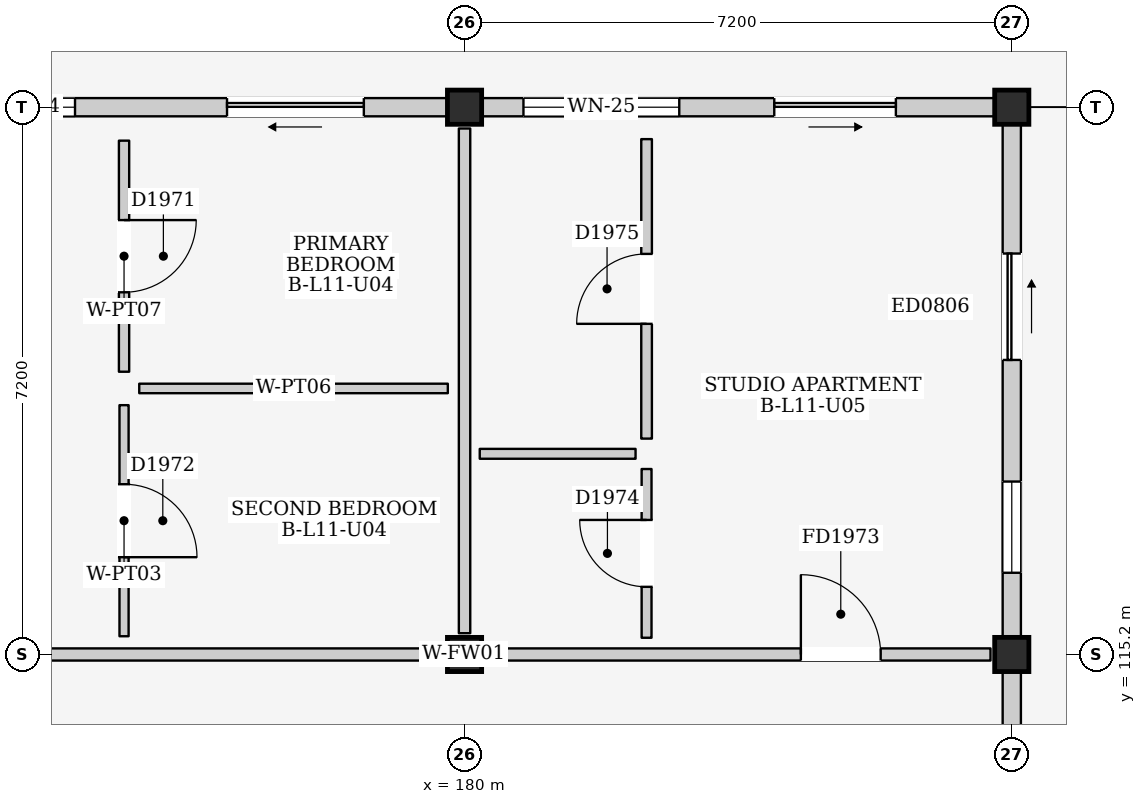
"""IFC4 building model, lengths in metres.
Left out: names, types, materials, properties, quantities, classifications, styles, units other than length and angle.
Written with IfcOpenShell. Run it as: python <this file> out.ifc"""

import sys

from ifc_helpers import new_model, si_unit, direction, frame, frame_2d, origin, origin_2d, place, context, subcontext, project, spatial, rectangle, extrude, element, fill, save


model = new_model("IFC4")
c1 = context("Model", 3, precision=1e-05, world=origin(), true_north=direction((0.0, 1.0)))
c2 = subcontext(c1, "Body", "Model", "MODEL_VIEW")
j1 = project(units=[si_unit("LENGTHUNIT", "METRE"), si_unit("PLANEANGLEUNIT", "RADIAN")], contexts=[c1])
p1 = place(None, origin())
s1 = spatial("IfcSite", under=j1, at=p1, CompositionType="ELEMENT")
p2 = place(p1, origin())
s2 = spatial("IfcBuilding", under=s1, at=p2, CompositionType="ELEMENT")
p3 = place(p2, frame((0.0, 0.0, 38.0)))
s3 = spatial("IfcBuildingStorey", under=s2, at=p3, CompositionType="ELEMENT", Elevation=38.0)
for number, where, z_axis, x_axis in (
    (1, (180.0, 115.2, 0.0), (0.0, 0.0, 1.0), (1.0, 0.0, 0.0)),
    (2, (180.0, 122.4, 0.0), (0.0, 0.0, 1.0), (1.0, 0.0, 0.0)),
    (3, (187.2, 115.2, 0.0), (0.0, 0.0, 1.0), (1.0, 0.0, 0.0)),
    (4, (187.2, 122.4, 0.0), (0.0, 0.0, 1.0), (1.0, 0.0, 0.0)),
):
    element("IfcColumn", number, at=place(p3, frame(where, z_axis=z_axis, x_axis=x_axis)), inside=s3, PredefinedType="COLUMN", context=c2, shape_type="SweptSolid", body=[
        extrude(rectangle(XDim=0.45, YDim=0.45, at=origin_2d()), origin(), (0.0, 0.0, 1.0), 3.2),
    ])
p4 = place(p3, frame((173.025, 122.4, 0.0), z_axis=(0.0, 0.0, 1.0), x_axis=(1.0, 0.0, 0.0)))
e5 = element("IfcWall", 5, at=p4, inside=s3, PredefinedType="ELEMENTEDWALL", context=c2, shape_type="SweptSolid", body=[
    extrude(rectangle(XDim=6.75, YDim=0.24, at=frame_2d((3.375, 0.0))), origin(), (0.0, 0.0, 1.0), 2.525),
])
p5 = place(p4, frame((3.85, 0.0, 0.0)))
e6 = element("IfcOpeningElement", 6, at=p5, cuts=e5, PredefinedType="OPENING", context=c2, shape_type="SweptSolid", body=[
    extrude(rectangle(XDim=1.8, YDim=2.12, at=frame_2d((0.9, 1.06))), frame((0.0, 0.135, 0.0), z_axis=(0.0, -1.0, 0.0), x_axis=(1.0, 0.0, 0.0)), (0.0, 0.0, 1.0), 0.27),
])
p6 = place(p4, frame((0.55, 0.0, 0.9)))
e7 = element("IfcOpeningElement", 7, at=p6, cuts=e5, PredefinedType="OPENING", context=c2, shape_type="SweptSolid", body=[
    extrude(rectangle(XDim=1.3, YDim=1.25, at=frame_2d((0.65, 0.625))), frame((0.0, 0.135, 0.0), z_axis=(0.0, -1.0, 0.0), x_axis=(1.0, 0.0, 0.0)), (0.0, 0.0, 1.0), 0.27),
])
p7 = place(p3, frame((187.2, 108.225, 0.0), z_axis=(0.0, 0.0, 1.0), x_axis=(0.0, 1.0, 0.0)))
e8 = element("IfcWall", 8, at=p7, inside=s3, PredefinedType="ELEMENTEDWALL", context=c2, shape_type="SweptSolid", body=[
    extrude(rectangle(XDim=6.75, YDim=0.24, at=frame_2d((3.375, 0.0))), origin(), (0.0, 0.0, 1.0), 2.525),
])
p8 = place(p7, frame((3.65, 0.0, 0.0)))
e9 = element("IfcOpeningElement", 9, at=p8, cuts=e8, PredefinedType="OPENING", context=c2, shape_type="SweptSolid", body=[
    extrude(rectangle(XDim=1.4, YDim=2.1, at=frame_2d((0.7, 1.05))), frame((0.0, 0.135, 0.0), z_axis=(0.0, -1.0, 0.0), x_axis=(1.0, 0.0, 0.0)), (0.0, 0.0, 1.0), 0.27),
])
p9 = place(p3, frame((180.225, 122.4, 0.0), z_axis=(0.0, 0.0, 1.0), x_axis=(1.0, 0.0, 0.0)))
e10 = element("IfcWall", 10, at=p9, inside=s3, PredefinedType="ELEMENTEDWALL", context=c2, shape_type="SweptSolid", body=[
    extrude(rectangle(XDim=6.75, YDim=0.24, at=frame_2d((3.375, 0.0))), origin(), (0.0, 0.0, 1.0), 2.525),
])
p10 = place(p9, frame((3.85, 0.0, 0.0)))
e11 = element("IfcOpeningElement", 11, at=p10, cuts=e10, PredefinedType="OPENING", context=c2, shape_type="SweptSolid", body=[
    extrude(rectangle(XDim=1.6, YDim=2.12, at=frame_2d((0.8, 1.06))), frame((0.0, 0.135, 0.0), z_axis=(0.0, -1.0, 0.0), x_axis=(1.0, 0.0, 0.0)), (0.0, 0.0, 1.0), 0.27),
])
p11 = place(p9, frame((0.55, 0.0, 0.815)))
e12 = element("IfcOpeningElement", 12, at=p11, cuts=e10, PredefinedType="OPENING", context=c2, shape_type="SweptSolid", body=[
    extrude(rectangle(XDim=2.05, YDim=1.6, at=frame_2d((1.025, 0.8))), frame((0.0, 0.135, 0.0), z_axis=(0.0, -1.0, 0.0), x_axis=(1.0, 0.0, 0.0)), (0.0, 0.0, 1.0), 0.27),
])
p12 = place(p3, frame((187.2, 115.425, 0.0), z_axis=(0.0, 0.0, 1.0), x_axis=(0.0, 1.0, 0.0)))
e13 = element("IfcWall", 13, at=p12, inside=s3, PredefinedType="ELEMENTEDWALL", context=c2, shape_type="SweptSolid", body=[
    extrude(rectangle(XDim=6.75, YDim=0.24, at=frame_2d((3.375, 0.0))), origin(), (0.0, 0.0, 1.0), 2.525),
])
p13 = place(p12, frame((3.65, 0.0, 0.0)))
e14 = element("IfcOpeningElement", 14, at=p13, cuts=e13, PredefinedType="OPENING", context=c2, shape_type="SweptSolid", body=[
    extrude(rectangle(XDim=1.4, YDim=2.1, at=frame_2d((0.7, 1.05))), frame((0.0, 0.135, 0.0), z_axis=(0.0, -1.0, 0.0), x_axis=(1.0, 0.0, 0.0)), (0.0, 0.0, 1.0), 0.27),
])
p14 = place(p12, frame((0.85, 0.0, 0.95)))
e15 = element("IfcOpeningElement", 15, at=p14, cuts=e13, PredefinedType="OPENING", context=c2, shape_type="SweptSolid", body=[
    extrude(rectangle(XDim=1.2, YDim=1.35, at=frame_2d((0.6, 0.675))), frame((0.0, 0.135, 0.0), z_axis=(0.0, -1.0, 0.0), x_axis=(1.0, 0.0, 0.0)), (0.0, 0.0, 1.0), 0.27),
])
p15 = place(p3, frame((173.055, 115.2, 0.0), z_axis=(0.0, 0.0, 1.0), x_axis=(1.0, 0.0, 0.0)))
e16 = element("IfcWall", 16, at=p15, inside=s3, PredefinedType="PARTITIONING", context=c2, shape_type="SweptSolid", body=[
    extrude(rectangle(XDim=6.69, YDim=0.16, at=frame_2d((3.345, 0.0))), origin(), (0.0, 0.0, 1.0), 2.375),
])
p16 = place(p15, frame((0.18, 0.0, 0.0)))
e17 = element("IfcOpeningElement", 17, at=p16, cuts=e16, PredefinedType="OPENING", context=c2, shape_type="SweptSolid", body=[
    extrude(rectangle(XDim=1.05, YDim=2.15, at=frame_2d((0.525, 1.075))), frame((0.0, 0.095, 0.0), z_axis=(0.0, -1.0, 0.0), x_axis=(1.0, 0.0, 0.0)), (0.0, 0.0, 1.0), 0.19),
])
p17 = place(p3, frame((180.0, 115.48, 0.0), z_axis=(0.0, 0.0, 1.0), x_axis=(0.0, 1.0, 0.0)))
e18 = element("IfcWall", 18, at=p17, inside=s3, PredefinedType="PARTITIONING", context=c2, shape_type="SweptSolid", body=[
    extrude(rectangle(XDim=6.64, YDim=0.15, at=frame_2d((3.32, 0.0))), origin(), (0.0, 0.0, 1.0), 2.475),
])
p18 = place(p3, frame((175.52, 118.92, 0.0), z_axis=(0.0, 0.0, 1.0), x_axis=(0.0, 1.0, 0.0)))
e19 = element("IfcWall", 19, at=p18, inside=s3, PredefinedType="PARTITIONING", context=c2, shape_type="SweptSolid", body=[
    extrude(rectangle(XDim=3.04, YDim=0.135, at=frame_2d((1.52, 0.0))), origin(), (0.0, 0.0, 1.0), 2.99),
])
p19 = place(p18, frame((1.045, 0.0, 0.0)))
e20 = element("IfcOpeningElement", 20, at=p19, cuts=e19, PredefinedType="OPENING", context=c2, shape_type="SweptSolid", body=[
    extrude(rectangle(XDim=0.95, YDim=2.15, at=frame_2d((0.475, 1.075))), frame((0.0, 0.083, 0.0), z_axis=(0.0, -1.0, 0.0), x_axis=(1.0, 0.0, 0.0)), (0.0, 0.0, 1.0), 0.165),
])
p20 = place(p3, frame((175.72, 118.7, 0.0), z_axis=(0.0, 0.0, 1.0), x_axis=(1.0, 0.0, 0.0)))
e21 = element("IfcWall", 21, at=p20, inside=s3, PredefinedType="PARTITIONING", context=c2, shape_type="SweptSolid", body=[
    extrude(rectangle(XDim=4.06, YDim=0.125, at=frame_2d((2.03, 0.0))), origin(), (0.0, 0.0, 1.0), 2.99),
])
p21 = place(p3, frame((175.52, 115.44, 0.0), z_axis=(0.0, 0.0, 1.0), x_axis=(0.0, 1.0, 0.0)))
e22 = element("IfcWall", 22, at=p21, inside=s3, PredefinedType="PARTITIONING", context=c2, shape_type="SweptSolid", body=[
    extrude(rectangle(XDim=3.04, YDim=0.12, at=frame_2d((1.52, 0.0))), origin(), (0.0, 0.0, 1.0), 2.99),
])
p22 = place(p21, frame((1.04, 0.0, 0.0)))
e23 = element("IfcOpeningElement", 23, at=p22, cuts=e22, PredefinedType="OPENING", context=c2, shape_type="SweptSolid", body=[
    extrude(rectangle(XDim=0.96, YDim=2.15, at=frame_2d((0.48, 1.075))), frame((0.0, 0.075, 0.0), z_axis=(0.0, -1.0, 0.0), x_axis=(1.0, 0.0, 0.0)), (0.0, 0.0, 1.0), 0.15),
])
p23 = place(p3, frame((180.255, 115.2, 0.0), z_axis=(0.0, 0.0, 1.0), x_axis=(1.0, 0.0, 0.0)))
e24 = element("IfcWall", 24, at=p23, inside=s3, PredefinedType="PARTITIONING", context=c2, shape_type="SweptSolid", body=[
    extrude(rectangle(XDim=6.665, YDim=0.16, at=frame_2d((3.333, 0.0))), origin(), (0.0, 0.0, 1.0), 2.375),
])
p24 = place(p23, frame((4.17, 0.0, 0.0)))
e25 = element("IfcOpeningElement", 25, at=p24, cuts=e24, PredefinedType="OPENING", context=c2, shape_type="SweptSolid", body=[
    extrude(rectangle(XDim=1.05, YDim=2.15, at=frame_2d((0.525, 1.075))), frame((0.0, 0.095, 0.0), z_axis=(0.0, -1.0, 0.0), x_axis=(1.0, 0.0, 0.0)), (0.0, 0.0, 1.0), 0.19),
])
p25 = place(p3, frame((180.2, 117.84, 0.0), z_axis=(0.0, 0.0, 1.0), x_axis=(1.0, 0.0, 0.0)))
e26 = element("IfcWall", 26, at=p25, inside=s3, PredefinedType="PARTITIONING", context=c2, shape_type="SweptSolid", body=[
    extrude(rectangle(XDim=2.05, YDim=0.13, at=frame_2d((1.025, 0.0))), origin(), (0.0, 0.0, 1.0), 2.99),
])
p26 = place(p3, frame((182.395, 115.42, 0.0), z_axis=(0.0, 0.0, 1.0), x_axis=(0.0, 1.0, 0.0)))
e27 = element("IfcWall", 27, at=p26, inside=s3, PredefinedType="PARTITIONING", context=c2, shape_type="SweptSolid", body=[
    extrude(rectangle(XDim=2.22, YDim=0.13, at=frame_2d((1.11, 0.0))), origin(), (0.0, 0.0, 1.0), 2.99),
])
p27 = place(p26, frame((0.67, 0.0, 0.0)))
e28 = element("IfcOpeningElement", 28, at=p27, cuts=e27, PredefinedType="OPENING", context=c2, shape_type="SweptSolid", body=[
    extrude(rectangle(XDim=0.88, YDim=2.1, at=frame_2d((0.44, 1.05))), frame((0.0, 0.08, 0.0), z_axis=(0.0, -1.0, 0.0), x_axis=(1.0, 0.0, 0.0)), (0.0, 0.0, 1.0), 0.16),
])
p28 = place(p3, frame((182.395, 118.04, 0.0), z_axis=(0.0, 0.0, 1.0), x_axis=(0.0, 1.0, 0.0)))
e29 = element("IfcWall", 29, at=p28, inside=s3, PredefinedType="PARTITIONING", context=c2, shape_type="SweptSolid", body=[
    extrude(rectangle(XDim=3.94, YDim=0.14, at=frame_2d((1.97, 0.0))), origin(), (0.0, 0.0, 1.0), 2.99),
])
p29 = place(p28, frame((1.51, 0.0, 0.0)))
e30 = element("IfcOpeningElement", 30, at=p29, cuts=e29, PredefinedType="OPENING", context=c2, shape_type="SweptSolid", body=[
    extrude(rectangle(XDim=0.92, YDim=2.1, at=frame_2d((0.46, 1.05))), frame((0.0, 0.085, 0.0), z_axis=(0.0, -1.0, 0.0), x_axis=(1.0, 0.0, 0.0)), (0.0, 0.0, 1.0), 0.17),
])
p30 = place(p5, frame((1.8, 0.0, 0.0), z_axis=(0.0, 0.0, 1.0), x_axis=(-1.0, 0.0, 0.0)))
e31 = element("IfcDoor", 31, at=p30, inside=s3, OperationType="SLIDING_TO_LEFT", PredefinedType="DOOR", context=c2, shape_type="SweptSolid", body=[
    extrude(rectangle(XDim=1.8, YDim=2.12, at=frame_2d((0.9, 1.06))), frame((0.0, 0.025, 0.0), z_axis=(0.0, -1.0, 0.0), x_axis=(1.0, 0.0, 0.0)), (0.0, 0.0, 1.0), 0.05),
])
fill(e6, e31)
p31 = place(p6, origin())
e32 = element("IfcWindow", 32, at=p31, inside=s3, PartitioningType="SINGLE_PANEL", PredefinedType="WINDOW", context=c2, shape_type="SweptSolid", body=[
    extrude(rectangle(XDim=1.3, YDim=1.25, at=frame_2d((0.65, 0.625))), frame((0.0, 0.03, 0.0), z_axis=(0.0, -1.0, 0.0), x_axis=(1.0, 0.0, 0.0)), (0.0, 0.0, 1.0), 0.06),
])
fill(e7, e32)
p32 = place(p10, frame((1.6, 0.0, 0.0), z_axis=(0.0, 0.0, 1.0), x_axis=(-1.0, 0.0, 0.0)))
e33 = element("IfcDoor", 33, at=p32, inside=s3, OperationType="SLIDING_TO_RIGHT", PredefinedType="DOOR", context=c2, shape_type="SweptSolid", body=[
    extrude(rectangle(XDim=1.6, YDim=2.12, at=frame_2d((0.8, 1.06))), frame((0.0, 0.025, 0.0), z_axis=(0.0, -1.0, 0.0), x_axis=(1.0, 0.0, 0.0)), (0.0, 0.0, 1.0), 0.05),
])
fill(e11, e33)
p33 = place(p11, origin())
e34 = element("IfcWindow", 34, at=p33, inside=s3, PartitioningType="DOUBLE_PANEL_VERTICAL", PredefinedType="WINDOW", context=c2, shape_type="SweptSolid", body=[
    extrude(rectangle(XDim=2.05, YDim=1.6, at=frame_2d((1.025, 0.8))), frame((0.0, 0.03, 0.0), z_axis=(0.0, -1.0, 0.0), x_axis=(1.0, 0.0, 0.0)), (0.0, 0.0, 1.0), 0.06),
])
fill(e12, e34)
p34 = place(p13, frame((1.4, 0.0, 0.0), z_axis=(0.0, 0.0, 1.0), x_axis=(-1.0, 0.0, 0.0)))
e35 = element("IfcDoor", 35, at=p34, inside=s3, OperationType="SLIDING_TO_RIGHT", PredefinedType="DOOR", context=c2, shape_type="SweptSolid", body=[
    extrude(rectangle(XDim=1.4, YDim=2.1, at=frame_2d((0.7, 1.05))), frame((0.0, 0.025, 0.0), z_axis=(0.0, -1.0, 0.0), x_axis=(1.0, 0.0, 0.0)), (0.0, 0.0, 1.0), 0.05),
])
fill(e14, e35)
p35 = place(p14, origin())
e36 = element("IfcWindow", 36, at=p35, inside=s3, PartitioningType="SINGLE_PANEL", PredefinedType="WINDOW", context=c2, shape_type="SweptSolid", body=[
    extrude(rectangle(XDim=1.2, YDim=1.35, at=frame_2d((0.6, 0.675))), frame((0.0, 0.03, 0.0), z_axis=(0.0, -1.0, 0.0), x_axis=(1.0, 0.0, 0.0)), (0.0, 0.0, 1.0), 0.06),
])
fill(e15, e36)
p36 = place(p19, frame((0.95, 0.0, 0.0), z_axis=(0.0, 0.0, 1.0), x_axis=(-1.0, 0.0, 0.0)))
e37 = element("IfcDoor", 37, at=p36, inside=s3, OperationType="SINGLE_SWING_LEFT", PredefinedType="DOOR", context=c2, shape_type="SweptSolid", body=[
    extrude(rectangle(XDim=0.95, YDim=2.15, at=frame_2d((0.475, 1.075))), frame((0.0, 0.025, 0.0), z_axis=(0.0, -1.0, 0.0), x_axis=(1.0, 0.0, 0.0)), (0.0, 0.0, 1.0), 0.05),
])
fill(e20, e37)
p37 = place(p22, frame((0.96, 0.0, 0.0), z_axis=(0.0, 0.0, 1.0), x_axis=(-1.0, 0.0, 0.0)))
e38 = element("IfcDoor", 38, at=p37, inside=s3, OperationType="SINGLE_SWING_RIGHT", PredefinedType="DOOR", context=c2, shape_type="SweptSolid", body=[
    extrude(rectangle(XDim=0.96, YDim=2.15, at=frame_2d((0.48, 1.075))), frame((0.0, 0.025, 0.0), z_axis=(0.0, -1.0, 0.0), x_axis=(1.0, 0.0, 0.0)), (0.0, 0.0, 1.0), 0.05),
])
fill(e23, e38)
p38 = place(p24, origin())
e39 = element("IfcDoor", 39, at=p38, inside=s3, OperationType="SINGLE_SWING_LEFT", PredefinedType="DOOR", context=c2, shape_type="SweptSolid", body=[
    extrude(rectangle(XDim=1.05, YDim=2.15, at=frame_2d((0.525, 1.075))), frame((0.0, 0.025, 0.0), z_axis=(0.0, -1.0, 0.0), x_axis=(1.0, 0.0, 0.0)), (0.0, 0.0, 1.0), 0.05),
])
fill(e25, e39)
p39 = place(p27, origin())
e40 = element("IfcDoor", 40, at=p39, inside=s3, OperationType="SINGLE_SWING_RIGHT", PredefinedType="DOOR", context=c2, shape_type="SweptSolid", body=[
    extrude(rectangle(XDim=0.88, YDim=2.1, at=frame_2d((0.44, 1.05))), frame((0.0, 0.025, 0.0), z_axis=(0.0, -1.0, 0.0), x_axis=(1.0, 0.0, 0.0)), (0.0, 0.0, 1.0), 0.05),
])
fill(e28, e40)
p40 = place(p29, origin())
e41 = element("IfcDoor", 41, at=p40, inside=s3, OperationType="SINGLE_SWING_LEFT", PredefinedType="DOOR", context=c2, shape_type="SweptSolid", body=[
    extrude(rectangle(XDim=0.92, YDim=2.1, at=frame_2d((0.46, 1.05))), frame((0.0, 0.025, 0.0), z_axis=(0.0, -1.0, 0.0), x_axis=(1.0, 0.0, 0.0)), (0.0, 0.0, 1.0), 0.05),
])
fill(e30, e41)
save(model, sys.argv[1])
